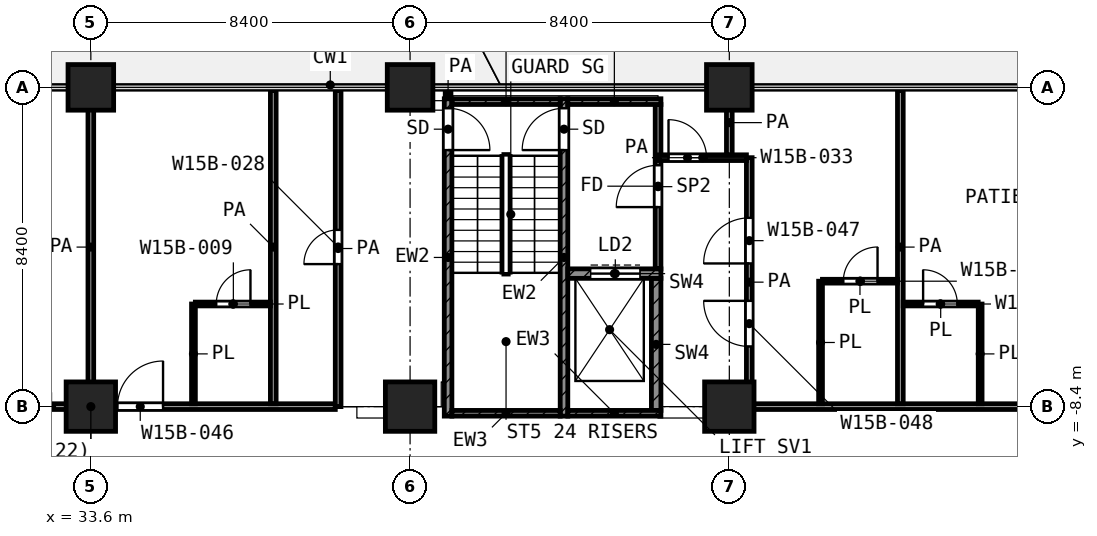
"""IFC4 building model, lengths in metres.
Left out: names, types, materials, properties, quantities, classifications, styles, units other than length and angle.
Written with IfcOpenShell. Run it as: python <this file> out.ifc"""

import sys

from ifc_helpers import new_model, si_unit, direction, frame, frame_2d, origin, origin_2d, place, context, subcontext, project, spatial, rectangle, extrude, element, fill, save


model = new_model("IFC4")
c1 = context("Model", 3, precision=1e-05, world=origin(), true_north=direction((0.0, 1.0)))
c2 = subcontext(c1, "Body", "Model", "MODEL_VIEW")
j1 = project(units=[si_unit("LENGTHUNIT", "METRE"), si_unit("PLANEANGLEUNIT", "RADIAN")], contexts=[c1])
p1 = place(None, origin())
s1 = spatial("IfcSite", under=j1, at=p1, CompositionType="ELEMENT")
p2 = place(p1, origin())
s2 = spatial("IfcBuilding", under=s1, at=p2, CompositionType="ELEMENT")
p3 = place(p2, frame((0.0, 0.0, 85.4)))
s3 = spatial("IfcBuildingStorey", under=s2, at=p3, CompositionType="ELEMENT", Elevation=85.4)
for number, where, z_axis, x_axis in (
    (1, (33.6, 0.0, 0.0), (0.0, 0.0, 1.0), (1.0, 0.0, 0.0)),
    (2, (42.0, 0.0, 0.0), (0.0, 0.0, 1.0), (1.0, 0.0, 0.0)),
    (3, (50.4, 0.0, 0.0), (0.0, 0.0, 1.0), (1.0, 0.0, 0.0)),
):
    element("IfcColumn", number, at=place(p3, frame(where, z_axis=z_axis, x_axis=x_axis)), inside=s3, PredefinedType="COLUMN", context=c2, shape_type="SweptSolid", body=[
        extrude(rectangle(XDim=1.2, YDim=1.2, at=origin_2d()), origin(), (0.0, 0.0, 1.0), 4.2),
    ])
for number, where, z_axis, x_axis in (
    (4, (33.6, -8.4, 0.0), (0.0, 0.0, 1.0), (1.0, 0.0, 0.0)),
    (5, (42.0, -8.4, 0.0), (0.0, 0.0, 1.0), (1.0, 0.0, 0.0)),
    (6, (50.4, -8.4, 0.0), (0.0, 0.0, 1.0), (1.0, 0.0, 0.0)),
):
    element("IfcColumn", number, at=place(p3, frame(where, z_axis=z_axis, x_axis=x_axis)), inside=s3, PredefinedType="COLUMN", context=c2, shape_type="SweptSolid", body=[
        extrude(rectangle(XDim=1.3, YDim=1.3, at=origin_2d()), origin(), (0.0, 0.0, 1.0), 4.2),
    ])
p4 = place(p3, frame((43.0, -8.65, 0.0), z_axis=(0.0, 0.0, 1.0), x_axis=(0.0, 1.0, 0.0)))
e7 = element("IfcWall", 7, at=p4, inside=s3, PredefinedType="SHEAR", context=c2, shape_type="SweptSolid", body=[
    extrude(rectangle(XDim=8.35, YDim=0.2, at=frame_2d((4.175, 0.0))), origin(), (0.0, 0.0, 1.0), 3.9),
])
p5 = place(p4, frame((7.0, 0.0, 0.0)))
e8 = element("IfcOpeningElement", 8, at=p5, cuts=e7, PredefinedType="OPENING", context=c2, shape_type="SweptSolid", body=[
    extrude(rectangle(XDim=1.1, YDim=2.1, at=frame_2d((0.55, 1.05))), frame((0.0, 0.11, 0.0), z_axis=(0.0, -1.0, 0.0), x_axis=(1.0, 0.0, 0.0)), (0.0, 0.0, 1.0), 0.22),
])
p6 = place(p3, frame((46.05, -8.65, 0.0), z_axis=(0.0, 0.0, 1.0), x_axis=(0.0, 1.0, 0.0)))
e9 = element("IfcWall", 9, at=p6, inside=s3, PredefinedType="SHEAR", context=c2, shape_type="SweptSolid", body=[
    extrude(rectangle(XDim=8.35, YDim=0.2, at=frame_2d((4.175, 0.0))), origin(), (0.0, 0.0, 1.0), 3.9),
])
p7 = place(p6, frame((7.0, 0.0, 0.0)))
e10 = element("IfcOpeningElement", 10, at=p7, cuts=e9, PredefinedType="OPENING", context=c2, shape_type="SweptSolid", body=[
    extrude(rectangle(XDim=1.1, YDim=2.1, at=frame_2d((0.55, 1.05))), frame((0.0, 0.11, 0.0), z_axis=(0.0, -1.0, 0.0), x_axis=(1.0, 0.0, 0.0)), (0.0, 0.0, 1.0), 0.22),
])
p8 = place(p3, frame((43.1, -0.375, 0.0), z_axis=(0.0, 0.0, 1.0), x_axis=(1.0, 0.0, 0.0)))
e11 = element("IfcWall", 11, at=p8, inside=s3, PredefinedType="SHEAR", context=c2, shape_type="SweptSolid", body=[
    extrude(rectangle(XDim=2.85, YDim=0.15, at=frame_2d((1.425, 0.0))), origin(), (0.0, 0.0, 1.0), 3.9),
])
p9 = place(p3, frame((46.15, -0.375, 0.0), z_axis=(0.0, 0.0, 1.0), x_axis=(1.0, 0.0, 0.0)))
e12 = element("IfcWall", 12, at=p9, inside=s3, PredefinedType="SHEAR", context=c2, shape_type="SweptSolid", body=[
    extrude(rectangle(XDim=2.45, YDim=0.15, at=frame_2d((1.225, 0.0))), origin(), (0.0, 0.0, 1.0), 3.9),
])
p10 = place(p3, frame((43.1, -8.575, 0.0), z_axis=(0.0, 0.0, 1.0), x_axis=(1.0, 0.0, 0.0)))
e13 = element("IfcWall", 13, at=p10, inside=s3, PredefinedType="SHEAR", context=c2, shape_type="SweptSolid", body=[
    extrude(rectangle(XDim=2.85, YDim=0.15, at=frame_2d((1.425, 0.0))), origin(), (0.0, 0.0, 1.0), 3.9),
])
p11 = place(p3, frame((46.15, -8.575, 0.0), z_axis=(0.0, 0.0, 1.0), x_axis=(1.0, 0.0, 0.0)))
e14 = element("IfcWall", 14, at=p11, inside=s3, PredefinedType="SHEAR", context=c2, shape_type="SweptSolid", body=[
    extrude(rectangle(XDim=2.45, YDim=0.15, at=frame_2d((1.225, 0.0))), origin(), (0.0, 0.0, 1.0), 3.9),
])
p12 = place(p3, frame((46.15, -4.9, 0.0), z_axis=(0.0, 0.0, 1.0), x_axis=(1.0, 0.0, 0.0)))
e15 = element("IfcWall", 15, at=p12, inside=s3, PredefinedType="SHEAR", context=c2, shape_type="SweptSolid", body=[
    extrude(rectangle(XDim=2.45, YDim=0.25, at=frame_2d((1.225, 0.0))), origin(), (0.0, 0.0, 1.0), 3.9),
])
p13 = place(p12, frame((0.6, 0.0, 0.0)))
e16 = element("IfcOpeningElement", 16, at=p13, cuts=e15, PredefinedType="OPENING", context=c2, shape_type="SweptSolid", body=[
    extrude(rectangle(XDim=1.3, YDim=2.1, at=frame_2d((0.65, 1.05))), frame((0.0, 0.135, 0.0), z_axis=(0.0, -1.0, 0.0), x_axis=(1.0, 0.0, 0.0)), (0.0, 0.0, 1.0), 0.27),
])
p14 = place(p3, frame((48.475, -8.5, 0.0), z_axis=(0.0, 0.0, 1.0), x_axis=(0.0, 1.0, 0.0)))
e17 = element("IfcWall", 17, at=p14, inside=s3, PredefinedType="SHEAR", context=c2, shape_type="SweptSolid", body=[
    extrude(rectangle(XDim=3.475, YDim=0.25, at=frame_2d((1.738, 0.0))), origin(), (0.0, 0.0, 1.0), 3.9),
])
p15 = place(p3, frame((48.525, -4.775, 0.0), z_axis=(0.0, 0.0, 1.0), x_axis=(0.0, 1.0, 0.0)))
e18 = element("IfcWall", 18, at=p15, inside=s3, PredefinedType="PARTITIONING", context=c2, shape_type="SweptSolid", body=[
    extrude(rectangle(XDim=4.325, YDim=0.15, at=frame_2d((2.163, 0.0))), origin(), (0.0, 0.0, 1.0), 3.9),
])
p16 = place(p15, frame((1.625, 0.0, 0.0)))
e19 = element("IfcOpeningElement", 19, at=p16, cuts=e18, PredefinedType="OPENING", context=c2, shape_type="SweptSolid", body=[
    extrude(rectangle(XDim=1.1, YDim=2.1, at=frame_2d((0.55, 1.05))), frame((0.0, 0.085, 0.0), z_axis=(0.0, -1.0, 0.0), x_axis=(1.0, 0.0, 0.0)), (0.0, 0.0, 1.0), 0.17),
])
p17 = place(p3, frame((36.35, -5.7, 0.0), z_axis=(0.0, 0.0, 1.0), x_axis=(1.0, 0.0, 0.0)))
e20 = element("IfcWall", 20, at=p17, inside=s3, PredefinedType="PARTITIONING", context=c2, shape_type="SweptSolid", body=[
    extrude(rectangle(XDim=1.975, YDim=0.1, at=frame_2d((0.987, 0.0))), origin(), (0.0, 0.0, 1.0), 3.9),
])
p18 = place(p17, frame((0.55, 0.0, 0.0)))
e21 = element("IfcOpeningElement", 21, at=p18, cuts=e20, PredefinedType="OPENING", context=c2, shape_type="SweptSolid", body=[
    extrude(rectangle(XDim=0.9, YDim=2.1, at=frame_2d((0.45, 1.05))), frame((0.0, 0.06, 0.0), z_axis=(0.0, -1.0, 0.0), x_axis=(1.0, 0.0, 0.0)), (0.0, 0.0, 1.0), 0.12),
])
p19 = place(p3, frame((54.975, -5.7, 0.0), z_axis=(0.0, 0.0, 1.0), x_axis=(1.0, 0.0, 0.0)))
e22 = element("IfcWall", 22, at=p19, inside=s3, PredefinedType="PARTITIONING", context=c2, shape_type="SweptSolid", body=[
    extrude(rectangle(XDim=1.973, YDim=0.1, at=frame_2d((0.986, 0.0))), origin(), (0.0, 0.0, 1.0), 3.9),
])
p20 = place(p19, frame((0.524, 0.0, 0.0)))
e23 = element("IfcOpeningElement", 23, at=p20, cuts=e22, PredefinedType="OPENING", context=c2, shape_type="SweptSolid", body=[
    extrude(rectangle(XDim=0.9, YDim=2.1, at=frame_2d((0.45, 1.05))), frame((0.0, 0.06, 0.0), z_axis=(0.0, -1.0, 0.0), x_axis=(1.0, 0.0, 0.0)), (0.0, 0.0, 1.0), 0.12),
])
p21 = place(p3, frame((52.85, -5.1, 0.0), z_axis=(0.0, 0.0, 1.0), x_axis=(1.0, 0.0, 0.0)))
e24 = element("IfcWall", 24, at=p21, inside=s3, PredefinedType="PARTITIONING", context=c2, shape_type="SweptSolid", body=[
    extrude(rectangle(XDim=1.975, YDim=0.1, at=frame_2d((0.987, 0.0))), origin(), (0.0, 0.0, 1.0), 3.9),
])
p22 = place(p21, frame((0.55, 0.0, 0.0)))
e25 = element("IfcOpeningElement", 25, at=p22, cuts=e24, PredefinedType="OPENING", context=c2, shape_type="SweptSolid", body=[
    extrude(rectangle(XDim=0.9, YDim=2.1, at=frame_2d((0.45, 1.05))), frame((0.0, 0.06, 0.0), z_axis=(0.0, -1.0, 0.0), x_axis=(1.0, 0.0, 0.0)), (0.0, 0.0, 1.0), 0.12),
])
p23 = place(p3, frame((36.3, -8.325, 0.0), z_axis=(0.0, 0.0, 1.0), x_axis=(0.0, 1.0, 0.0)))
e26 = element("IfcWall", 26, at=p23, inside=s3, PredefinedType="PARTITIONING", context=c2, shape_type="SweptSolid", body=[
    extrude(rectangle(XDim=2.625, YDim=0.1, at=frame_2d((1.312, 0.0))), origin(), (0.0, 0.0, 1.0), 3.9),
])
p24 = place(p3, frame((52.8, -8.325, 0.0), z_axis=(0.0, 0.0, 1.0), x_axis=(0.0, 1.0, 0.0)))
e27 = element("IfcWall", 27, at=p24, inside=s3, PredefinedType="PARTITIONING", context=c2, shape_type="SweptSolid", body=[
    extrude(rectangle(XDim=3.225, YDim=0.1, at=frame_2d((1.612, 0.0))), origin(), (0.0, 0.0, 1.0), 3.9),
])
p25 = place(p3, frame((57.0, -8.325, 0.0), z_axis=(0.0, 0.0, 1.0), x_axis=(0.0, 1.0, 0.0)))
e28 = element("IfcWall", 28, at=p25, inside=s3, PredefinedType="PARTITIONING", context=c2, shape_type="SweptSolid", body=[
    extrude(rectangle(XDim=2.624, YDim=0.1, at=frame_2d((1.312, 0.0))), origin(), (0.0, 0.0, 1.0), 3.9),
])
p26 = place(p3, frame((25.1, -8.4, 0.0), z_axis=(0.0, 0.0, 1.0), x_axis=(1.0, 0.0, 0.0)))
e29 = element("IfcWall", 29, at=p26, inside=s3, PredefinedType="PARTITIONING", context=c2, shape_type="SweptSolid", body=[
    extrude(rectangle(XDim=14.932, YDim=0.15, at=frame_2d((7.466, 0.0))), origin(), (0.0, 0.0, 1.0), 3.9),
])
p27 = place(p26, frame((3.55, 0.0, 0.0)))
e30 = element("IfcOpeningElement", 30, at=p27, cuts=e29, PredefinedType="OPENING", context=c2, shape_type="SweptSolid", body=[
    extrude(rectangle(XDim=1.5, YDim=2.1, at=frame_2d((0.75, 1.05))), frame((0.0, 0.085, 0.0), z_axis=(0.0, -1.0, 0.0), x_axis=(1.0, 0.0, 0.0)), (0.0, 0.0, 1.0), 0.17),
])
p28 = place(p26, frame((9.2, 0.0, 0.0)))
e31 = element("IfcOpeningElement", 31, at=p28, cuts=e29, PredefinedType="OPENING", context=c2, shape_type="SweptSolid", body=[
    extrude(rectangle(XDim=1.2, YDim=2.1, at=frame_2d((0.6, 1.05))), frame((0.0, 0.085, 0.0), z_axis=(0.0, -1.0, 0.0), x_axis=(1.0, 0.0, 0.0)), (0.0, 0.0, 1.0), 0.17),
])
p29 = place(p3, frame((51.0, -8.4, 0.0), z_axis=(0.0, 0.0, 1.0), x_axis=(1.0, 0.0, 0.0)))
e32 = element("IfcWall", 32, at=p29, inside=s3, PredefinedType="PARTITIONING", context=c2, shape_type="SweptSolid", body=[
    extrude(rectangle(XDim=28.72, YDim=0.15, at=frame_2d((14.36, 0.0))), origin(), (0.0, 0.0, 1.0), 3.9),
])
p30 = place(p29, frame((8.5, 0.0, 0.0)))
e33 = element("IfcOpeningElement", 33, at=p30, cuts=e32, PredefinedType="OPENING", context=c2, shape_type="SweptSolid", body=[
    extrude(rectangle(XDim=1.2, YDim=2.1, at=frame_2d((0.6, 1.05))), frame((0.0, 0.085, 0.0), z_axis=(0.0, -1.0, 0.0), x_axis=(1.0, 0.0, 0.0)), (0.0, 0.0, 1.0), 0.17),
])
p31 = place(p29, frame((10.05, 0.0, 0.0)))
e34 = element("IfcOpeningElement", 34, at=p31, cuts=e32, PredefinedType="OPENING", context=c2, shape_type="SweptSolid", body=[
    extrude(rectangle(XDim=1.1, YDim=2.1, at=frame_2d((0.55, 1.05))), frame((0.0, 0.085, 0.0), z_axis=(0.0, -1.0, 0.0), x_axis=(1.0, 0.0, 0.0)), (0.0, 0.0, 1.0), 0.17),
])
p32 = place(p29, frame((13.8, 0.0, 0.0)))
e35 = element("IfcOpeningElement", 35, at=p32, cuts=e32, PredefinedType="OPENING", context=c2, shape_type="SweptSolid", body=[
    extrude(rectangle(XDim=1.2, YDim=2.1, at=frame_2d((0.6, 1.05))), frame((0.0, 0.085, 0.0), z_axis=(0.0, -1.0, 0.0), x_axis=(1.0, 0.0, 0.0)), (0.0, 0.0, 1.0), 0.17),
])
p33 = place(p29, frame((16.9, 0.0, 0.0)))
e36 = element("IfcOpeningElement", 36, at=p33, cuts=e32, PredefinedType="OPENING", context=c2, shape_type="SweptSolid", body=[
    extrude(rectangle(XDim=1.2, YDim=2.1, at=frame_2d((0.6, 1.05))), frame((0.0, 0.085, 0.0), z_axis=(0.0, -1.0, 0.0), x_axis=(1.0, 0.0, 0.0)), (0.0, 0.0, 1.0), 0.17),
])
p34 = place(p29, frame((22.35, 0.0, 0.0)))
e37 = element("IfcOpeningElement", 37, at=p34, cuts=e32, PredefinedType="OPENING", context=c2, shape_type="SweptSolid", body=[
    extrude(rectangle(XDim=1.5, YDim=2.1, at=frame_2d((0.75, 1.05))), frame((0.0, 0.085, 0.0), z_axis=(0.0, -1.0, 0.0), x_axis=(1.0, 0.0, 0.0)), (0.0, 0.0, 1.0), 0.17),
])
p35 = place(p3, frame((48.55, -1.85, 0.0), z_axis=(0.0, 0.0, 1.0), x_axis=(1.0, 0.0, 0.0)))
e38 = element("IfcWall", 38, at=p35, inside=s3, PredefinedType="PARTITIONING", context=c2, shape_type="SweptSolid", body=[
    extrude(rectangle(XDim=2.3, YDim=0.15, at=frame_2d((1.15, 0.0))), origin(), (0.0, 0.0, 1.0), 3.9),
])
p36 = place(p35, frame((0.25, 0.0, 0.0)))
e39 = element("IfcOpeningElement", 39, at=p36, cuts=e38, PredefinedType="OPENING", context=c2, shape_type="SweptSolid", body=[
    extrude(rectangle(XDim=1.0, YDim=2.1, at=frame_2d((0.5, 1.05))), frame((0.0, 0.085, 0.0), z_axis=(0.0, -1.0, 0.0), x_axis=(1.0, 0.0, 0.0)), (0.0, 0.0, 1.0), 0.17),
])
for number, where, z_axis, x_axis in (
    (40, (33.6, -8.325, 0.0), (0.0, 0.0, 1.0), (0.0, 1.0, 0.0)),
    (41, (38.4, -8.325, 0.0), (0.0, 0.0, 1.0), (0.0, 1.0, 0.0)),
):
    element("IfcWall", number, at=place(p3, frame(where, z_axis=z_axis, x_axis=x_axis)), inside=s3, PredefinedType="PARTITIONING", context=c2, shape_type="SweptSolid", body=[
        extrude(rectangle(XDim=8.245, YDim=0.15, at=frame_2d((4.123, 0.0))), origin(), (0.0, 0.0, 1.0), 3.9),
    ])
p37 = place(p3, frame((40.107, -8.4, 0.0), z_axis=(0.0, 0.0, 1.0), x_axis=(0.0, 1.0, 0.0)))
e42 = element("IfcWall", 42, at=p37, inside=s3, PredefinedType="PARTITIONING", context=c2, shape_type="SweptSolid", body=[
    extrude(rectangle(XDim=8.32, YDim=0.15, at=frame_2d((4.16, 0.0))), origin(), (0.0, 0.0, 1.0), 3.9),
])
p38 = place(p37, frame((3.75, 0.0, 0.0)))
e43 = element("IfcOpeningElement", 43, at=p38, cuts=e42, PredefinedType="OPENING", context=c2, shape_type="SweptSolid", body=[
    extrude(rectangle(XDim=0.9, YDim=2.1, at=frame_2d((0.45, 1.05))), frame((0.0, 0.085, 0.0), z_axis=(0.0, -1.0, 0.0), x_axis=(1.0, 0.0, 0.0)), (0.0, 0.0, 1.0), 0.17),
])
p39 = place(p3, frame((43.0, -0.27, 0.0), z_axis=(0.0, 0.0, 1.0), x_axis=(0.0, 1.0, 0.0)))
e44 = element("IfcWall", 44, at=p39, inside=s3, PredefinedType="PARTITIONING", context=c2, shape_type="SweptSolid", body=[
    extrude(rectangle(XDim=0.19, YDim=0.15, at=frame_2d((0.095, 0.0))), origin(), (0.0, 0.0, 1.0), 3.9),
])
p40 = place(p3, frame((50.4, -1.775, 0.0), z_axis=(0.0, 0.0, 1.0), x_axis=(0.0, 1.0, 0.0)))
e45 = element("IfcWall", 45, at=p40, inside=s3, PredefinedType="PARTITIONING", context=c2, shape_type="SweptSolid", body=[
    extrude(rectangle(XDim=1.695, YDim=0.15, at=frame_2d((0.847, 0.0))), origin(), (0.0, 0.0, 1.0), 3.9),
])
p41 = place(p3, frame((50.925, -8.4, 0.0), z_axis=(0.0, 0.0, 1.0), x_axis=(0.0, 1.0, 0.0)))
e46 = element("IfcWall", 46, at=p41, inside=s3, PredefinedType="PARTITIONING", context=c2, shape_type="SweptSolid", body=[
    extrude(rectangle(XDim=6.55, YDim=0.15, at=frame_2d((3.275, 0.0))), origin(), (0.0, 0.0, 1.0), 3.9),
])
p42 = place(p41, frame((3.767, 0.0, 0.0)))
e47 = element("IfcOpeningElement", 47, at=p42, cuts=e46, PredefinedType="OPENING", context=c2, shape_type="SweptSolid", body=[
    extrude(rectangle(XDim=1.2, YDim=2.1, at=frame_2d((0.6, 1.05))), frame((0.0, 0.085, 0.0), z_axis=(0.0, -1.0, 0.0), x_axis=(1.0, 0.0, 0.0)), (0.0, 0.0, 1.0), 0.17),
])
p43 = place(p41, frame((1.583, 0.0, 0.0)))
e48 = element("IfcOpeningElement", 48, at=p43, cuts=e46, PredefinedType="OPENING", context=c2, shape_type="SweptSolid", body=[
    extrude(rectangle(XDim=1.2, YDim=2.1, at=frame_2d((0.6, 1.05))), frame((0.0, 0.085, 0.0), z_axis=(0.0, -1.0, 0.0), x_axis=(1.0, 0.0, 0.0)), (0.0, 0.0, 1.0), 0.17),
])
p44 = place(p3, frame((54.9, -8.325, 0.0), z_axis=(0.0, 0.0, 1.0), x_axis=(0.0, 1.0, 0.0)))
e49 = element("IfcWall", 49, at=p44, inside=s3, PredefinedType="PARTITIONING", context=c2, shape_type="SweptSolid", body=[
    extrude(rectangle(XDim=8.245, YDim=0.15, at=frame_2d((4.123, 0.0))), origin(), (0.0, 0.0, 1.0), 3.9),
])
p45 = place(p5, frame((1.1, 0.0, 0.0), z_axis=(0.0, 0.0, 1.0), x_axis=(-1.0, 0.0, 0.0)))
e50 = element("IfcDoor", 50, at=p45, inside=s3, OperationType="SINGLE_SWING_LEFT", PredefinedType="DOOR", context=c2, shape_type="SweptSolid", body=[
    extrude(rectangle(XDim=1.1, YDim=2.1, at=frame_2d((0.55, 1.05))), frame((0.0, 0.025, 0.0), z_axis=(0.0, -1.0, 0.0), x_axis=(1.0, 0.0, 0.0)), (0.0, 0.0, 1.0), 0.05),
])
fill(e8, e50)
p46 = place(p7, origin())
e51 = element("IfcDoor", 51, at=p46, inside=s3, OperationType="SINGLE_SWING_LEFT", PredefinedType="DOOR", context=c2, shape_type="SweptSolid", body=[
    extrude(rectangle(XDim=1.1, YDim=2.1, at=frame_2d((0.55, 1.05))), frame((0.0, 0.025, 0.0), z_axis=(0.0, -1.0, 0.0), x_axis=(1.0, 0.0, 0.0)), (0.0, 0.0, 1.0), 0.05),
])
fill(e10, e51)
p47 = place(p13, origin())
e52 = element("IfcDoor", 52, at=p47, inside=s3, OperationType="DOUBLE_DOOR_SLIDING", PredefinedType="DOOR", context=c2, shape_type="SweptSolid", body=[
    extrude(rectangle(XDim=1.3, YDim=2.1, at=frame_2d((0.65, 1.05))), frame((0.0, 0.025, 0.0), z_axis=(0.0, -1.0, 0.0), x_axis=(1.0, 0.0, 0.0)), (0.0, 0.0, 1.0), 0.05),
])
fill(e16, e52)
p48 = place(p16, origin())
e53 = element("IfcDoor", 53, at=p48, inside=s3, OperationType="SINGLE_SWING_LEFT", PredefinedType="DOOR", context=c2, shape_type="SweptSolid", body=[
    extrude(rectangle(XDim=1.1, YDim=2.1, at=frame_2d((0.55, 1.05))), frame((0.0, 0.025, 0.0), z_axis=(0.0, -1.0, 0.0), x_axis=(1.0, 0.0, 0.0)), (0.0, 0.0, 1.0), 0.05),
])
fill(e19, e53)
p49 = place(p28, origin())
e54 = element("IfcDoor", 54, at=p49, inside=s3, OperationType="SINGLE_SWING_RIGHT", PredefinedType="DOOR", context=c2, shape_type="SweptSolid", body=[
    extrude(rectangle(XDim=1.2, YDim=2.1, at=frame_2d((0.6, 1.05))), frame((0.0, 0.025, 0.0), z_axis=(0.0, -1.0, 0.0), x_axis=(1.0, 0.0, 0.0)), (0.0, 0.0, 1.0), 0.05),
])
fill(e31, e54)
p50 = place(p18, origin())
e55 = element("IfcDoor", 55, at=p50, inside=s3, OperationType="SINGLE_SWING_RIGHT", PredefinedType="DOOR", context=c2, shape_type="SweptSolid", body=[
    extrude(rectangle(XDim=0.9, YDim=2.1, at=frame_2d((0.45, 1.05))), frame((0.0, 0.025, 0.0), z_axis=(0.0, -1.0, 0.0), x_axis=(1.0, 0.0, 0.0)), (0.0, 0.0, 1.0), 0.05),
])
fill(e21, e55)
p51 = place(p36, origin())
e56 = element("IfcDoor", 56, at=p51, inside=s3, OperationType="SINGLE_SWING_LEFT", PredefinedType="DOOR", context=c2, shape_type="SweptSolid", body=[
    extrude(rectangle(XDim=1.0, YDim=2.1, at=frame_2d((0.5, 1.05))), frame((0.0, 0.025, 0.0), z_axis=(0.0, -1.0, 0.0), x_axis=(1.0, 0.0, 0.0)), (0.0, 0.0, 1.0), 0.05),
])
fill(e39, e56)
p52 = place(p42, origin())
e57 = element("IfcDoor", 57, at=p52, inside=s3, OperationType="SINGLE_SWING_LEFT", PredefinedType="DOOR", context=c2, shape_type="SweptSolid", body=[
    extrude(rectangle(XDim=1.2, YDim=2.1, at=frame_2d((0.6, 1.05))), frame((0.0, 0.025, 0.0), z_axis=(0.0, -1.0, 0.0), x_axis=(1.0, 0.0, 0.0)), (0.0, 0.0, 1.0), 0.05),
])
fill(e47, e57)
p53 = place(p43, origin())
e58 = element("IfcDoor", 58, at=p53, inside=s3, OperationType="SINGLE_SWING_RIGHT", PredefinedType="DOOR", context=c2, shape_type="SweptSolid", body=[
    extrude(rectangle(XDim=1.2, YDim=2.1, at=frame_2d((0.6, 1.05))), frame((0.0, 0.025, 0.0), z_axis=(0.0, -1.0, 0.0), x_axis=(1.0, 0.0, 0.0)), (0.0, 0.0, 1.0), 0.05),
])
fill(e48, e58)
p54 = place(p22, origin())
e59 = element("IfcDoor", 59, at=p54, inside=s3, OperationType="SINGLE_SWING_RIGHT", PredefinedType="DOOR", context=c2, shape_type="SweptSolid", body=[
    extrude(rectangle(XDim=0.9, YDim=2.1, at=frame_2d((0.45, 1.05))), frame((0.0, 0.025, 0.0), z_axis=(0.0, -1.0, 0.0), x_axis=(1.0, 0.0, 0.0)), (0.0, 0.0, 1.0), 0.05),
])
fill(e25, e59)
p55 = place(p20, origin())
e60 = element("IfcDoor", 60, at=p55, inside=s3, OperationType="SINGLE_SWING_LEFT", PredefinedType="DOOR", context=c2, shape_type="SweptSolid", body=[
    extrude(rectangle(XDim=0.9, YDim=2.1, at=frame_2d((0.45, 1.05))), frame((0.0, 0.025, 0.0), z_axis=(0.0, -1.0, 0.0), x_axis=(1.0, 0.0, 0.0)), (0.0, 0.0, 1.0), 0.05),
])
fill(e23, e60)
p56 = place(p38, origin())
e61 = element("IfcDoor", 61, at=p56, inside=s3, OperationType="SINGLE_SWING_LEFT", PredefinedType="DOOR", context=c2, shape_type="SweptSolid", body=[
    extrude(rectangle(XDim=0.9, YDim=2.1, at=frame_2d((0.45, 1.05))), frame((0.0, 0.025, 0.0), z_axis=(0.0, -1.0, 0.0), x_axis=(1.0, 0.0, 0.0)), (0.0, 0.0, 1.0), 0.05),
])
fill(e43, e61)
save(model, sys.argv[1])
